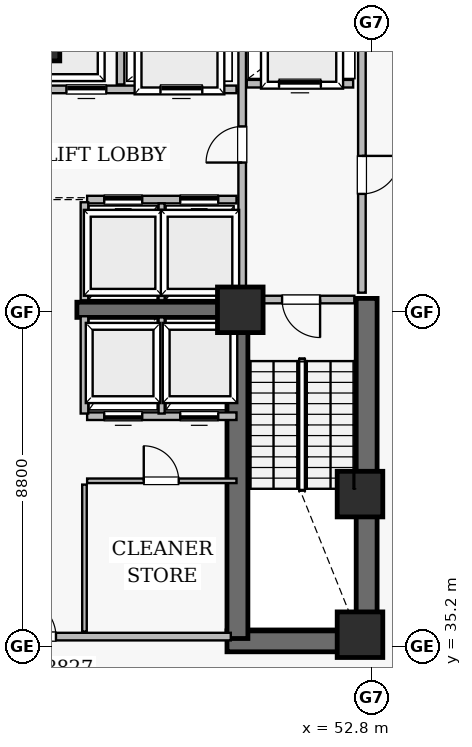
"""IFC4 building model, lengths in metres.
Left out: names, types, materials, properties, quantities, classifications, styles, units other than length and angle.
Written with IfcOpenShell. Run it as: python <this file> out.ifc"""

import sys

from ifc_helpers import new_model, si_unit, direction, frame, frame_2d, origin, origin_2d, place, context, subcontext, project, spatial, rectangle, extrude, element, fill, save


model = new_model("IFC4")
c1 = context("Model", 3, precision=1e-05, world=origin(), true_north=direction((0.0, 1.0)))
c2 = subcontext(c1, "Body", "Model", "MODEL_VIEW")
j1 = project(units=[si_unit("LENGTHUNIT", "METRE"), si_unit("PLANEANGLEUNIT", "RADIAN")], contexts=[c1])
p1 = place(None, origin())
s1 = spatial("IfcSite", under=j1, at=p1, CompositionType="ELEMENT")
p2 = place(p1, origin())
s2 = spatial("IfcBuilding", under=s1, at=p2, CompositionType="ELEMENT")
p3 = place(p2, frame((0.0, 0.0, 95.8)))
s3 = spatial("IfcBuildingStorey", under=s2, at=p3, CompositionType="ELEMENT", Elevation=95.8)
p4 = place(p3, frame((49.0, 35.325, 0.0), z_axis=(0.0, 0.0, 1.0), x_axis=(1.0, 0.0, 0.0)))
e1 = element("IfcWall", 1, at=p4, inside=s3, PredefinedType="SHEAR", context=c2, shape_type="SweptSolid", body=[
    extrude(rectangle(XDim=3.95, YDim=0.55, at=frame_2d((1.975, 0.0))), origin(), (0.0, 0.0, 1.0), 4.335),
])
p5 = place(p3, frame((52.675, 35.05, 0.0), z_axis=(0.0, 0.0, 1.0), x_axis=(0.0, 1.0, 0.0)))
e2 = element("IfcWall", 2, at=p5, inside=s3, PredefinedType="SHEAR", context=c2, shape_type="SweptSolid", body=[
    extrude(rectangle(XDim=9.3, YDim=0.55, at=frame_2d((4.65, 0.0))), origin(), (0.0, 0.0, 1.0), 4.335),
])
p6 = place(p3, frame((49.275, 35.4, 0.0), z_axis=(0.0, 0.0, 1.0), x_axis=(0.0, 1.0, 0.0)))
e3 = element("IfcWall", 3, at=p6, inside=s3, PredefinedType="SHEAR", context=c2, shape_type="SweptSolid", body=[
    extrude(rectangle(XDim=8.95, YDim=0.55, at=frame_2d((4.475, 0.0))), origin(), (0.0, 0.0, 1.0), 4.335),
])
p7 = place(p3, frame((45.05, 44.05, 0.0), z_axis=(0.0, 0.0, 1.0), x_axis=(1.0, 0.0, 0.0)))
e4 = element("IfcWall", 4, at=p7, inside=s3, PredefinedType="SHEAR", context=c2, shape_type="SweptSolid", body=[
    extrude(rectangle(XDim=4.2, YDim=0.4, at=frame_2d((2.1, 0.0))), origin(), (0.0, 0.0, 1.0), 4.335),
])
for number, where, z_axis, x_axis in (
    (5, (52.5, 35.5, 0.0), (0.0, 0.0, 1.0), (1.0, 0.0, 0.0)),
    (6, (52.5, 39.2, 0.0), (0.0, 0.0, 1.0), (1.0, 0.0, 0.0)),
    (7, (49.35, 44.05, 0.0), (0.0, 0.0, 1.0), (1.0, 0.0, 0.0)),
    (8, (44.0, 51.2, 0.0), (0.0, 0.0, 1.0), (1.0, 0.0, 0.0)),
):
    element("IfcColumn", number, at=place(p3, frame(where, z_axis=z_axis, x_axis=x_axis)), inside=s3, PredefinedType="COLUMN", context=c2, shape_type="SweptSolid", body=[
        extrude(rectangle(XDim=1.2, YDim=1.2, at=origin_2d()), origin(), (0.0, 0.0, 1.0), 4.6),
    ])
p8 = place(p3, frame((38.9, 35.45, 0.0), z_axis=(0.0, 0.0, 1.0), x_axis=(1.0, 0.0, 0.0)))
e9 = element("IfcWall", 9, at=p8, inside=s3, PredefinedType="SOLIDWALL", context=c2, shape_type="SweptSolid", body=[
    extrude(rectangle(XDim=10.2, YDim=0.2, at=frame_2d((5.1, 0.0))), origin(), (0.0, 0.0, 1.0), 4.335),
])
p9 = place(p8, frame((4.6, 0.0, 0.0)))
e10 = element("IfcOpeningElement", 10, at=p9, cuts=e9, PredefinedType="OPENING", context=c2, shape_type="SweptSolid", body=[
    extrude(rectangle(XDim=1.0, YDim=2.15, at=frame_2d((0.5, 1.075))), frame((0.0, 0.11, 0.0), z_axis=(0.0, -1.0, 0.0), x_axis=(1.0, 0.0, 0.0)), (0.0, 0.0, 1.0), 0.22),
])
p10 = place(p3, frame((52.55, 44.5, 0.0), z_axis=(0.0, 0.0, 1.0), x_axis=(0.0, 1.0, 0.0)))
e11 = element("IfcWall", 11, at=p10, inside=s3, PredefinedType="SOLIDWALL", context=c2, shape_type="SweptSolid", body=[
    extrude(rectangle(XDim=7.92, YDim=0.2, at=frame_2d((3.96, 0.0))), origin(), (0.0, 0.0, 1.0), 4.335),
])
p11 = place(p10, frame((2.6, 0.0, 0.0)))
e12 = element("IfcOpeningElement", 12, at=p11, cuts=e11, PredefinedType="OPENING", context=c2, shape_type="SweptSolid", body=[
    extrude(rectangle(XDim=1.0, YDim=2.15, at=frame_2d((0.5, 1.075))), frame((0.0, 0.11, 0.0), z_axis=(0.0, -1.0, 0.0), x_axis=(1.0, 0.0, 0.0)), (0.0, 0.0, 1.0), 0.22),
])
p12 = place(p3, frame((49.4, 44.5, 0.0), z_axis=(0.0, 0.0, 1.0), x_axis=(0.0, 1.0, 0.0)))
e13 = element("IfcWall", 13, at=p12, inside=s3, PredefinedType="SOLIDWALL", context=c2, shape_type="SweptSolid", body=[
    extrude(rectangle(XDim=7.92, YDim=0.2, at=frame_2d((3.96, 0.0))), origin(), (0.0, 0.0, 1.0), 3.423),
])
p13 = place(p12, frame((3.425, 0.0, 0.0)))
e14 = element("IfcOpeningElement", 14, at=p13, cuts=e13, PredefinedType="OPENING", context=c2, shape_type="SweptSolid", body=[
    extrude(rectangle(XDim=0.95, YDim=2.15, at=frame_2d((0.475, 1.075))), frame((0.0, 0.11, 0.0), z_axis=(0.0, -1.0, 0.0), x_axis=(1.0, 0.0, 0.0)), (0.0, 0.0, 1.0), 0.22),
])
p14 = place(p3, frame((44.25, 49.85, 0.0), z_axis=(0.0, 0.0, 1.0), x_axis=(1.0, 0.0, 0.0)))
e15 = element("IfcWall", 15, at=p14, inside=s3, PredefinedType="SOLIDWALL", context=c2, shape_type="SweptSolid", body=[
    extrude(rectangle(XDim=5.0, YDim=0.2, at=frame_2d((2.5, 0.0))), origin(), (0.0, 0.0, 1.0), 3.423),
])
p15 = place(p14, frame((0.525, 0.0, 0.0)))
e16 = element("IfcOpeningElement", 16, at=p15, cuts=e15, PredefinedType="OPENING", context=c2, shape_type="SweptSolid", body=[
    extrude(rectangle(XDim=1.05, YDim=2.15, at=frame_2d((0.525, 1.075))), frame((0.0, 0.11, 0.0), z_axis=(0.0, -1.0, 0.0), x_axis=(1.0, 0.0, 0.0)), (0.0, 0.0, 1.0), 0.22),
])
p16 = place(p14, frame((3.0, 0.0, 0.0)))
e17 = element("IfcOpeningElement", 17, at=p16, cuts=e15, PredefinedType="OPENING", context=c2, shape_type="SweptSolid", body=[
    extrude(rectangle(XDim=1.1, YDim=2.15, at=frame_2d((0.55, 1.075))), frame((0.0, 0.11, 0.0), z_axis=(0.0, -1.0, 0.0), x_axis=(1.0, 0.0, 0.0)), (0.0, 0.0, 1.0), 0.22),
])
p17 = place(p3, frame((45.32, 46.95, 0.0), z_axis=(0.0, 0.0, 1.0), x_axis=(1.0, 0.0, 0.0)))
e18 = element("IfcWall", 18, at=p17, inside=s3, PredefinedType="SOLIDWALL", context=c2, shape_type="SweptSolid", body=[
    extrude(rectangle(XDim=3.93, YDim=0.2, at=frame_2d((1.965, 0.0))), origin(), (0.0, 0.0, 1.0), 3.423),
])
p18 = place(p17, frame((0.45, 0.0, 0.0)))
e19 = element("IfcOpeningElement", 19, at=p18, cuts=e18, PredefinedType="OPENING", context=c2, shape_type="SweptSolid", body=[
    extrude(rectangle(XDim=1.0, YDim=2.15, at=frame_2d((0.5, 1.075))), frame((0.0, 0.11, 0.0), z_axis=(0.0, -1.0, 0.0), x_axis=(1.0, 0.0, 0.0)), (0.0, 0.0, 1.0), 0.22),
])
p19 = place(p17, frame((2.45, 0.0, 0.0)))
e20 = element("IfcOpeningElement", 20, at=p19, cuts=e18, PredefinedType="OPENING", context=c2, shape_type="SweptSolid", body=[
    extrude(rectangle(XDim=1.0, YDim=2.15, at=frame_2d((0.5, 1.075))), frame((0.0, 0.11, 0.0), z_axis=(0.0, -1.0, 0.0), x_axis=(1.0, 0.0, 0.0)), (0.0, 0.0, 1.0), 0.22),
])
p20 = place(p3, frame((45.32, 41.25, 0.0), z_axis=(0.0, 0.0, 1.0), x_axis=(1.0, 0.0, 0.0)))
e21 = element("IfcWall", 21, at=p20, inside=s3, PredefinedType="SOLIDWALL", context=c2, shape_type="SweptSolid", body=[
    extrude(rectangle(XDim=3.93, YDim=0.2, at=frame_2d((1.965, 0.0))), origin(), (0.0, 0.0, 1.0), 4.335),
])
p21 = place(p20, frame((0.45, 0.0, 0.0)))
e22 = element("IfcOpeningElement", 22, at=p21, cuts=e21, PredefinedType="OPENING", context=c2, shape_type="SweptSolid", body=[
    extrude(rectangle(XDim=1.0, YDim=2.15, at=frame_2d((0.5, 1.075))), frame((0.0, 0.11, 0.0), z_axis=(0.0, -1.0, 0.0), x_axis=(1.0, 0.0, 0.0)), (0.0, 0.0, 1.0), 0.22),
])
p22 = place(p20, frame((2.45, 0.0, 0.0)))
e23 = element("IfcOpeningElement", 23, at=p22, cuts=e21, PredefinedType="OPENING", context=c2, shape_type="SweptSolid", body=[
    extrude(rectangle(XDim=1.0, YDim=2.15, at=frame_2d((0.5, 1.075))), frame((0.0, 0.11, 0.0), z_axis=(0.0, -1.0, 0.0), x_axis=(1.0, 0.0, 0.0)), (0.0, 0.0, 1.0), 0.22),
])
p23 = place(p3, frame((45.32, 39.55, 0.0), z_axis=(0.0, 0.0, 1.0), x_axis=(1.0, 0.0, 0.0)))
e24 = element("IfcWall", 24, at=p23, inside=s3, PredefinedType="PARTITIONING", context=c2, shape_type="SweptSolid", body=[
    extrude(rectangle(XDim=3.93, YDim=0.12, at=frame_2d((1.965, 0.0))), origin(), (0.0, 0.0, 1.0), 4.335),
])
p24 = place(p23, frame((1.49, 0.0, 0.0)))
e25 = element("IfcOpeningElement", 25, at=p24, cuts=e24, PredefinedType="OPENING", context=c2, shape_type="SweptSolid", body=[
    extrude(rectangle(XDim=0.92, YDim=2.1, at=frame_2d((0.46, 1.05))), frame((0.0, 0.07, 0.0), z_axis=(0.0, -1.0, 0.0), x_axis=(1.0, 0.0, 0.0)), (0.0, 0.0, 1.0), 0.14),
])
p25 = place(p3, frame((49.55, 44.32, 0.0), z_axis=(0.0, 0.0, 1.0), x_axis=(1.0, 0.0, 0.0)))
e26 = element("IfcWall", 26, at=p25, inside=s3, PredefinedType="SOLIDWALL", context=c2, shape_type="SweptSolid", body=[
    extrude(rectangle(XDim=2.8, YDim=0.2, at=frame_2d((1.4, 0.0))), origin(), (0.0, 0.0, 1.0), 3.423),
])
p26 = place(p25, frame((0.9, 0.0, 0.0)))
e27 = element("IfcOpeningElement", 27, at=p26, cuts=e26, PredefinedType="OPENING", context=c2, shape_type="SweptSolid", body=[
    extrude(rectangle(XDim=1.0, YDim=2.15, at=frame_2d((0.5, 1.075))), frame((0.0, 0.11, 0.0), z_axis=(0.0, -1.0, 0.0), x_axis=(1.0, 0.0, 0.0)), (0.0, 0.0, 1.0), 0.22),
])
p27 = place(p3, frame((49.52, 50.0, 0.0), z_axis=(0.0, 0.0, 1.0), x_axis=(1.0, 0.0, 0.0)))
e28 = element("IfcWall", 28, at=p27, inside=s3, PredefinedType="SOLIDWALL", context=c2, shape_type="SweptSolid", body=[
    extrude(rectangle(XDim=2.8, YDim=0.2, at=frame_2d((1.4, 0.0))), origin(), (0.0, 0.0, 1.0), 4.335),
])
p28 = place(p27, frame((0.85, 0.0, 0.0)))
e29 = element("IfcOpeningElement", 29, at=p28, cuts=e28, PredefinedType="OPENING", context=c2, shape_type="SweptSolid", body=[
    extrude(rectangle(XDim=1.1, YDim=2.15, at=frame_2d((0.55, 1.075))), frame((0.0, 0.11, 0.0), z_axis=(0.0, -1.0, 0.0), x_axis=(1.0, 0.0, 0.0)), (0.0, 0.0, 1.0), 0.22),
])
p29 = place(p3, frame((45.25, 35.58, 0.0), z_axis=(0.0, 0.0, 1.0), x_axis=(0.0, 1.0, 0.0)))
e30 = element("IfcWall", 30, at=p29, inside=s3, PredefinedType="PARTITIONING", context=c2, shape_type="SweptSolid", body=[
    extrude(rectangle(XDim=3.87, YDim=0.12, at=frame_2d((1.935, 0.0))), origin(), (0.0, 0.0, 1.0), 4.335),
])
p30 = place(p3, frame((45.25, 44.3, 0.0), z_axis=(0.0, 0.0, 1.0), x_axis=(0.0, 1.0, 0.0)))
e31 = element("IfcWall", 31, at=p30, inside=s3, PredefinedType="SOLIDWALL", context=c2, shape_type="SweptSolid", body=[
    extrude(rectangle(XDim=2.58, YDim=0.2, at=frame_2d((1.29, 0.0))), origin(), (0.0, 0.0, 1.0), 4.335),
])
p31 = place(p3, frame((45.25, 41.32, 0.0), z_axis=(0.0, 0.0, 1.0), x_axis=(0.0, 1.0, 0.0)))
e32 = element("IfcWall", 32, at=p31, inside=s3, PredefinedType="SOLIDWALL", context=c2, shape_type="SweptSolid", body=[
    extrude(rectangle(XDim=2.56, YDim=0.2, at=frame_2d((1.28, 0.0))), origin(), (0.0, 0.0, 1.0), 4.335),
])
p32 = place(p3, frame((47.28, 44.3, 0.0), z_axis=(0.0, 0.0, 1.0), x_axis=(0.0, 1.0, 0.0)))
e33 = element("IfcWall", 33, at=p32, inside=s3, PredefinedType="SOLIDWALL", context=c2, shape_type="SweptSolid", body=[
    extrude(rectangle(XDim=2.55, YDim=0.16, at=frame_2d((1.275, 0.0))), origin(), (0.0, 0.0, 1.0), 3.423),
])
p33 = place(p3, frame((47.28, 41.32, 0.0), z_axis=(0.0, 0.0, 1.0), x_axis=(0.0, 1.0, 0.0)))
e34 = element("IfcWall", 34, at=p33, inside=s3, PredefinedType="SOLIDWALL", context=c2, shape_type="SweptSolid", body=[
    extrude(rectangle(XDim=2.53, YDim=0.16, at=frame_2d((1.265, 0.0))), origin(), (0.0, 0.0, 1.0), 4.335),
])
p34 = place(p3, frame((46.2, 49.98, 0.0), z_axis=(0.0, 0.0, 1.0), x_axis=(0.0, 1.0, 0.0)))
e35 = element("IfcWall", 35, at=p34, inside=s3, PredefinedType="SOLIDWALL", context=c2, shape_type="SweptSolid", body=[
    extrude(rectangle(XDim=2.37, YDim=0.2, at=frame_2d((1.185, 0.0))), origin(), (0.0, 0.0, 1.0), 4.335),
])
p35 = place(p26, frame((1.0, 0.0, 0.0), z_axis=(0.0, 0.0, 1.0), x_axis=(-1.0, 0.0, 0.0)))
e36 = element("IfcDoor", 36, at=p35, inside=s3, OperationType="SINGLE_SWING_RIGHT", PredefinedType="DOOR", context=c2, shape_type="SweptSolid", body=[
    extrude(rectangle(XDim=1.0, YDim=2.15, at=frame_2d((0.5, 1.075))), frame((0.0, 0.025, 0.0), z_axis=(0.0, -1.0, 0.0), x_axis=(1.0, 0.0, 0.0)), (0.0, 0.0, 1.0), 0.05),
])
fill(e27, e36)
p36 = place(p11, frame((1.0, 0.0, 0.0), z_axis=(0.0, 0.0, 1.0), x_axis=(-1.0, 0.0, 0.0)))
e37 = element("IfcDoor", 37, at=p36, inside=s3, OperationType="SINGLE_SWING_RIGHT", PredefinedType="DOOR", context=c2, shape_type="SweptSolid", body=[
    extrude(rectangle(XDim=1.0, YDim=2.15, at=frame_2d((0.5, 1.075))), frame((0.0, 0.025, 0.0), z_axis=(0.0, -1.0, 0.0), x_axis=(1.0, 0.0, 0.0)), (0.0, 0.0, 1.0), 0.05),
])
fill(e12, e37)
p37 = place(p13, origin())
e38 = element("IfcDoor", 38, at=p37, inside=s3, OperationType="SINGLE_SWING_LEFT", PredefinedType="DOOR", context=c2, shape_type="SweptSolid", body=[
    extrude(rectangle(XDim=0.95, YDim=2.15, at=frame_2d((0.475, 1.075))), frame((0.0, 0.025, 0.0), z_axis=(0.0, -1.0, 0.0), x_axis=(1.0, 0.0, 0.0)), (0.0, 0.0, 1.0), 0.05),
])
fill(e14, e38)
p38 = place(p28, origin())
e39 = element("IfcDoor", 39, at=p38, inside=s3, OperationType="SLIDING_TO_LEFT", PredefinedType="DOOR", context=c2, shape_type="SweptSolid", body=[
    extrude(rectangle(XDim=1.1, YDim=2.15, at=frame_2d((0.55, 1.075))), frame((0.0, 0.025, 0.0), z_axis=(0.0, -1.0, 0.0), x_axis=(1.0, 0.0, 0.0)), (0.0, 0.0, 1.0), 0.05),
])
fill(e29, e39)
p39 = place(p9, origin())
e40 = element("IfcDoor", 40, at=p39, inside=s3, OperationType="SINGLE_SWING_LEFT", PredefinedType="DOOR", context=c2, shape_type="SweptSolid", body=[
    extrude(rectangle(XDim=1.0, YDim=2.15, at=frame_2d((0.5, 1.075))), frame((0.0, 0.025, 0.0), z_axis=(0.0, -1.0, 0.0), x_axis=(1.0, 0.0, 0.0)), (0.0, 0.0, 1.0), 0.05),
])
fill(e10, e40)
p40 = place(p15, origin())
e41 = element("IfcDoor", 41, at=p40, inside=s3, OperationType="SLIDING_TO_LEFT", PredefinedType="DOOR", context=c2, shape_type="SweptSolid", body=[
    extrude(rectangle(XDim=1.05, YDim=2.15, at=frame_2d((0.525, 1.075))), frame((0.0, 0.025, 0.0), z_axis=(0.0, -1.0, 0.0), x_axis=(1.0, 0.0, 0.0)), (0.0, 0.0, 1.0), 0.05),
])
fill(e16, e41)
p41 = place(p16, origin())
e42 = element("IfcDoor", 42, at=p41, inside=s3, OperationType="SLIDING_TO_LEFT", PredefinedType="DOOR", context=c2, shape_type="SweptSolid", body=[
    extrude(rectangle(XDim=1.1, YDim=2.15, at=frame_2d((0.55, 1.075))), frame((0.0, 0.025, 0.0), z_axis=(0.0, -1.0, 0.0), x_axis=(1.0, 0.0, 0.0)), (0.0, 0.0, 1.0), 0.05),
])
fill(e17, e42)
p42 = place(p18, origin())
e43 = element("IfcDoor", 43, at=p42, inside=s3, OperationType="SLIDING_TO_LEFT", PredefinedType="DOOR", context=c2, shape_type="SweptSolid", body=[
    extrude(rectangle(XDim=1.0, YDim=2.15, at=frame_2d((0.5, 1.075))), frame((0.0, 0.025, 0.0), z_axis=(0.0, -1.0, 0.0), x_axis=(1.0, 0.0, 0.0)), (0.0, 0.0, 1.0), 0.05),
])
fill(e19, e43)
p43 = place(p19, origin())
e44 = element("IfcDoor", 44, at=p43, inside=s3, OperationType="SLIDING_TO_LEFT", PredefinedType="DOOR", context=c2, shape_type="SweptSolid", body=[
    extrude(rectangle(XDim=1.0, YDim=2.15, at=frame_2d((0.5, 1.075))), frame((0.0, 0.025, 0.0), z_axis=(0.0, -1.0, 0.0), x_axis=(1.0, 0.0, 0.0)), (0.0, 0.0, 1.0), 0.05),
])
fill(e20, e44)
p44 = place(p21, frame((1.0, 0.0, 0.0), z_axis=(0.0, 0.0, 1.0), x_axis=(-1.0, 0.0, 0.0)))
e45 = element("IfcDoor", 45, at=p44, inside=s3, OperationType="SLIDING_TO_LEFT", PredefinedType="DOOR", context=c2, shape_type="SweptSolid", body=[
    extrude(rectangle(XDim=1.0, YDim=2.15, at=frame_2d((0.5, 1.075))), frame((0.0, 0.025, 0.0), z_axis=(0.0, -1.0, 0.0), x_axis=(1.0, 0.0, 0.0)), (0.0, 0.0, 1.0), 0.05),
])
fill(e22, e45)
p45 = place(p22, frame((1.0, 0.0, 0.0), z_axis=(0.0, 0.0, 1.0), x_axis=(-1.0, 0.0, 0.0)))
e46 = element("IfcDoor", 46, at=p45, inside=s3, OperationType="SLIDING_TO_LEFT", PredefinedType="DOOR", context=c2, shape_type="SweptSolid", body=[
    extrude(rectangle(XDim=1.0, YDim=2.15, at=frame_2d((0.5, 1.075))), frame((0.0, 0.025, 0.0), z_axis=(0.0, -1.0, 0.0), x_axis=(1.0, 0.0, 0.0)), (0.0, 0.0, 1.0), 0.05),
])
fill(e23, e46)
p46 = place(p24, origin())
e47 = element("IfcDoor", 47, at=p46, inside=s3, OperationType="SINGLE_SWING_LEFT", PredefinedType="DOOR", context=c2, shape_type="SweptSolid", body=[
    extrude(rectangle(XDim=0.92, YDim=2.1, at=frame_2d((0.46, 1.05))), frame((0.0, 0.025, 0.0), z_axis=(0.0, -1.0, 0.0), x_axis=(1.0, 0.0, 0.0)), (0.0, 0.0, 1.0), 0.05),
])
fill(e25, e47)
save(model, sys.argv[1])
